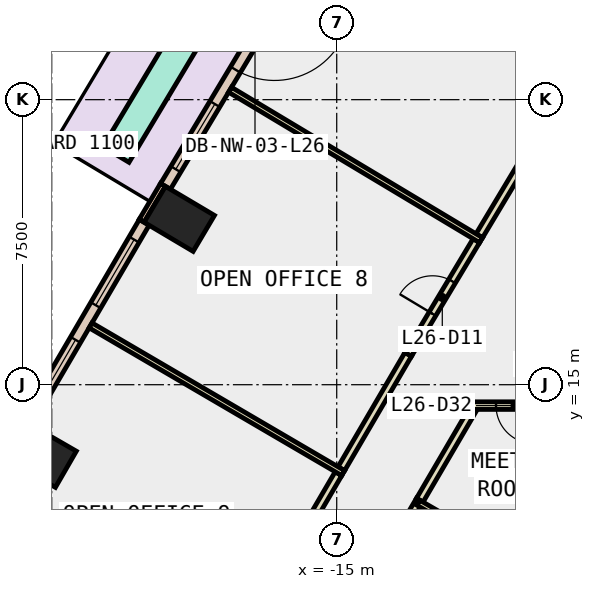
"""IFC4 building model, lengths in metres.
Left out: names, types, materials, properties, quantities, classifications, styles, units other than length and angle.
Written with IfcOpenShell. Run it as: python <this file> out.ifc"""

import sys

from ifc_helpers import new_model, si_unit, direction, frame, frame_2d, origin, origin_2d, place, context, subcontext, project, spatial, polyline, rectangle, outline, extrude, element, fill, save


model = new_model("IFC4")
c1 = context("Model", 3, precision=1e-05, world=origin(), true_north=direction((0.0, 1.0)))
c2 = subcontext(c1, "Body", "Model", "MODEL_VIEW")
j1 = project(units=[si_unit("LENGTHUNIT", "METRE"), si_unit("PLANEANGLEUNIT", "RADIAN")], contexts=[c1])
p1 = place(None, origin())
s1 = spatial("IfcSite", under=j1, at=p1, CompositionType="ELEMENT")
p2 = place(p1, origin())
s2 = spatial("IfcBuilding", under=s1, at=p2, CompositionType="ELEMENT")
p3 = place(p2, frame((0.0, 0.0, 120.2)))
s3 = spatial("IfcBuildingStorey", under=s2, at=p3, CompositionType="ELEMENT", Elevation=120.2)
for number, where, z_axis, x_axis in (
    (1, (-19.143, 19.364, -0.4), (0.0, 0.0, 1.0), (0.51, 0.86, 0.0)),
    (2, (-22.777, 13.15, -0.4), (0.0, 0.0, 1.0), (0.5, 0.866, 0.0)),
):
    element("IfcColumn", number, at=place(p3, frame(where, z_axis=z_axis, x_axis=x_axis)), inside=s3, PredefinedType="COLUMN", context=c2, shape_type="SweptSolid", body=[
        extrude(rectangle(XDim=1.1, YDim=1.5, at=origin_2d()), origin(), (0.0, 0.0, 1.0), 4.2),
    ])
p4 = place(p3, frame((0.0, 0.0, -0.4)))
e3 = element("IfcWall", 3, at=p4, inside=s3, PredefinedType="SHEAR", context=c2, shape_type="SweptSolid", body=[
    extrude(outline(polyline([(-12.267, 5.252), (-11.488, 4.802), (-6.409, 13.6), (-6.928, 14.5), (-12.267, 5.252)])), origin(), (0.0, 0.0, 1.0), 4.2),
])
p5 = place(p3, frame((-19.572, 20.258, 0.0), z_axis=(0.0, 0.0, 1.0), x_axis=(-0.510082245696, -0.860125631885, 0.0)))
e4 = element("IfcWall", 4, at=p5, inside=s3, PredefinedType="STANDARD", context=c2, shape_type="SweptSolid", body=[
    extrude(rectangle(XDim=1.1, YDim=0.15, at=frame_2d((0.55, 0.0))), origin(), (0.0, 0.0, 1.0), 3.8),
])
p6 = place(p3, frame((-16.365, 25.458, 0.0), z_axis=(0.0, 0.0, 1.0), x_axis=(-0.514078503149, -0.857743139057, 0.0)))
e5 = element("IfcWall", 5, at=p6, inside=s3, PredefinedType="STANDARD", context=c2, shape_type="SweptSolid", body=[
    extrude(rectangle(XDim=6.11, YDim=0.3, at=frame_2d((3.055, 0.0))), origin(), (0.0, 0.0, 1.0), 3.8),
])
p7 = place(p6, frame((0.528, 0.0, 0.0)))
e6 = element("IfcOpeningElement", 6, at=p7, cuts=e5, PredefinedType="OPENING", context=c2, shape_type="SweptSolid", body=[
    extrude(rectangle(XDim=2.0, YDim=2.4, at=frame_2d((1.0, 1.2))), frame((0.0, 0.16, 0.0), z_axis=(0.0, -1.0, 0.0), x_axis=(1.0, 0.0, 0.0)), (0.0, 0.0, 1.0), 0.32),
])
p8 = place(p6, frame((3.583, 0.0, 0.9)))
e7 = element("IfcOpeningElement", 7, at=p8, cuts=e5, PredefinedType="OPENING", context=c2, shape_type="SweptSolid", body=[
    extrude(rectangle(XDim=2.0, YDim=2.6, at=frame_2d((1.0, 1.3))), frame((0.0, 0.16, 0.0), z_axis=(0.0, -1.0, 0.0), x_axis=(1.0, 0.0, 0.0)), (0.0, 0.0, 1.0), 0.32),
])
p9 = place(p3, frame((-20.065, 19.273, 0.0), z_axis=(0.0, 0.0, 1.0), x_axis=(-0.504790055126, -0.863242144619, 0.0)))
e8 = element("IfcWall", 8, at=p9, inside=s3, PredefinedType="STANDARD", context=c2, shape_type="SweptSolid", body=[
    extrude(rectangle(XDim=6.109, YDim=0.3, at=frame_2d((3.055, 0.0))), origin(), (0.0, 0.0, 1.0), 3.8),
])
p10 = place(p9, frame((0.527, 0.0, 0.9)))
e9 = element("IfcOpeningElement", 9, at=p10, cuts=e8, PredefinedType="OPENING", context=c2, shape_type="SweptSolid", body=[
    extrude(rectangle(XDim=2.0, YDim=2.6, at=frame_2d((1.0, 1.3))), frame((0.0, 0.16, 0.0), z_axis=(0.0, -1.0, 0.0), x_axis=(1.0, 0.0, 0.0)), (0.0, 0.0, 1.0), 0.32),
])
p11 = place(p9, frame((3.582, 0.0, 0.9)))
e10 = element("IfcOpeningElement", 10, at=p11, cuts=e8, PredefinedType="OPENING", context=c2, shape_type="SweptSolid", body=[
    extrude(rectangle(XDim=2.0, YDim=2.6, at=frame_2d((1.0, 1.3))), frame((0.0, 0.16, 0.0), z_axis=(0.0, -1.0, 0.0), x_axis=(1.0, 0.0, 0.0)), (0.0, 0.0, 1.0), 0.32),
])
p12 = place(p3, frame((-17.72, 26.212, 0.0), z_axis=(0.0, 0.0, 1.0), x_axis=(-0.514017743989, -0.857779551437, 0.0)))
e11 = element("IfcWall", 11, at=p12, inside=s3, PredefinedType="STANDARD", context=c2, shape_type="SweptSolid", body=[
    extrude(rectangle(XDim=6.01, YDim=0.8, at=frame_2d((3.005, 0.0))), origin(), (0.0, 0.0, 1.0), 0.8),
])
p13 = place(p3, frame((-11.409, 14.364, 0.0), z_axis=(0.0, 0.0, 1.0), x_axis=(-0.504846343003, -0.863209227219, 0.0)))
e12 = element("IfcWall", 12, at=p13, inside=s3, PredefinedType="PARTITIONING", context=c2, shape_type="SweptSolid", body=[
    extrude(rectangle(XDim=2.785, YDim=0.2, at=frame_2d((1.393, 0.0))), origin(), (0.0, 0.0, 1.0), 3.8),
])
p14 = place(p3, frame((-12.815, 11.96, 0.0), z_axis=(0.0, 0.0, 1.0), x_axis=(-0.5048198861, -0.863224699946, 0.0)))
e13 = element("IfcWall", 13, at=p14, inside=s3, PredefinedType="PARTITIONING", context=c2, shape_type="SweptSolid", body=[
    extrude(rectangle(XDim=3.95, YDim=0.2, at=frame_2d((1.975, 0.0))), origin(), (0.0, 0.0, 1.0), 3.8),
])
p15 = place(p14, frame((1.475, 0.0, 0.0)))
e14 = element("IfcOpeningElement", 14, at=p15, cuts=e13, PredefinedType="OPENING", context=c2, shape_type="SweptSolid", body=[
    extrude(rectangle(XDim=1.0, YDim=2.1, at=frame_2d((0.5, 1.05))), frame((0.0, 0.11, 0.0), z_axis=(0.0, -1.0, 0.0), x_axis=(1.0, 0.0, 0.0)), (0.0, 0.0, 1.0), 0.22),
])
for number, where, z_axis, x_axis in (
    (15, (-11.249, 18.918, 0.0), (0.0, 0.0, 1.0), (0.514, 0.858, 0.0)),
    (16, (-14.879, 12.789, 0.0), (0.0, 0.0, 1.0), (0.505, 0.863, 0.0)),
):
    element("IfcWall", number, at=place(p3, frame(where, z_axis=z_axis, x_axis=x_axis)), inside=s3, PredefinedType="PARTITIONING", context=c2, shape_type="SweptSolid", body=[
        extrude(rectangle(XDim=3.487, YDim=0.2, at=frame_2d((1.743, 0.0))), origin(), (0.0, 0.0, 1.0), 3.8),
    ])
p16 = place(p3, frame((-13.119, 15.799, 0.0), z_axis=(0.0, 0.0, 1.0), x_axis=(0.514155958966, 0.857696712049, 0.0)))
e17 = element("IfcWall", 17, at=p16, inside=s3, PredefinedType="PARTITIONING", context=c2, shape_type="SweptSolid", body=[
    extrude(rectangle(XDim=3.487, YDim=0.2, at=frame_2d((1.744, 0.0))), origin(), (0.0, 0.0, 1.0), 3.8),
])
p17 = place(p16, frame((1.244, 0.0, 0.0)))
e18 = element("IfcOpeningElement", 18, at=p17, cuts=e17, PredefinedType="OPENING", context=c2, shape_type="SweptSolid", body=[
    extrude(rectangle(XDim=1.0, YDim=2.1, at=frame_2d((0.5, 1.05))), frame((0.0, 0.11, 0.0), z_axis=(0.0, -1.0, 0.0), x_axis=(1.0, 0.0, 0.0)), (0.0, 0.0, 1.0), 0.22),
])
p18 = place(p3, frame((-16.714, 9.65, 0.0), z_axis=(0.0, 0.0, 1.0), x_axis=(0.504885284202, 0.863186451351, 0.0)))
e19 = element("IfcWall", 19, at=p18, inside=s3, PredefinedType="PARTITIONING", context=c2, shape_type="SweptSolid", body=[
    extrude(rectangle(XDim=3.486, YDim=0.2, at=frame_2d((1.743, 0.0))), origin(), (0.0, 0.0, 1.0), 3.8),
])
p19 = place(p3, frame((-9.537, 9.981, 0.0), z_axis=(0.0, 0.0, 1.0), x_axis=(-0.866068787954, 0.499924848885, 0.0)))
e20 = element("IfcWall", 20, at=p19, inside=s3, PredefinedType="PARTITIONING", context=c2, shape_type="SweptSolid", body=[
    extrude(rectangle(XDim=3.829, YDim=0.15, at=frame_2d((1.914, 0.0))), origin(), (0.0, 0.0, 1.0), 3.8),
])
p20 = place(p3, frame((-6.957, 14.45, 0.0), z_axis=(0.0, 0.0, 1.0), x_axis=(-1.0, 0.0, 0.0)))
e21 = element("IfcWall", 21, at=p20, inside=s3, PredefinedType="PARTITIONING", context=c2, shape_type="SweptSolid", body=[
    extrude(rectangle(XDim=4.502, YDim=0.2, at=frame_2d((2.251, 0.0))), origin(), (0.0, 0.0, 1.0), 3.8),
])
p21 = place(p20, frame((1.751, 0.0, 0.0)))
e22 = element("IfcOpeningElement", 22, at=p21, cuts=e21, PredefinedType="OPENING", context=c2, shape_type="SweptSolid", body=[
    extrude(rectangle(XDim=1.0, YDim=2.1, at=frame_2d((0.5, 1.05))), frame((0.0, 0.11, 0.0), z_axis=(0.0, -1.0, 0.0), x_axis=(1.0, 0.0, 0.0)), (0.0, 0.0, 1.0), 0.22),
])
p22 = place(p20, frame((2.851, 0.0, 0.0)))
e23 = element("IfcOpeningElement", 23, at=p22, cuts=e21, PredefinedType="OPENING", context=c2, shape_type="SweptSolid", body=[
    extrude(rectangle(XDim=1.0, YDim=2.1, at=frame_2d((0.5, 1.05))), frame((0.0, 0.11, 0.0), z_axis=(0.0, -1.0, 0.0), x_axis=(1.0, 0.0, 0.0)), (0.0, 0.0, 1.0), 0.22),
])
p23 = place(p3, frame((-11.202, 18.803, 0.0), z_axis=(0.0, 0.0, 1.0), x_axis=(-0.857778149162, 0.514020084062, 0.0)))
e24 = element("IfcWall", 24, at=p23, inside=s3, PredefinedType="PARTITIONING", context=c2, shape_type="SweptSolid", body=[
    extrude(rectangle(XDim=7.7, YDim=0.15, at=frame_2d((3.85, 0.0))), origin(), (0.0, 0.0, 1.0), 3.8),
])
p24 = place(p3, frame((-14.83, 12.674, 0.0), z_axis=(0.0, 0.0, 1.0), x_axis=(-0.863237916953, 0.504797284794, 0.0)))
e25 = element("IfcWall", 25, at=p24, inside=s3, PredefinedType="PARTITIONING", context=c2, shape_type="SweptSolid", body=[
    extrude(rectangle(XDim=7.7, YDim=0.15, at=frame_2d((3.85, 0.0))), origin(), (0.0, 0.0, 1.0), 3.8),
])
p25 = place(p7, origin())
e26 = element("IfcDoor", 26, at=p25, inside=s3, OperationType="SLIDING_TO_LEFT", PredefinedType="DOOR", context=c2, shape_type="SweptSolid", body=[
    extrude(rectangle(XDim=2.0, YDim=2.4, at=frame_2d((1.0, 1.2))), frame((0.0, 0.025, 0.0), z_axis=(0.0, -1.0, 0.0), x_axis=(1.0, 0.0, 0.0)), (0.0, 0.0, 1.0), 0.05),
])
fill(e6, e26)
p26 = place(p8, origin())
e27 = element("IfcWindow", 27, at=p26, inside=s3, PartitioningType="SINGLE_PANEL", PredefinedType="WINDOW", context=c2, shape_type="SweptSolid", body=[
    extrude(rectangle(XDim=2.0, YDim=2.6, at=frame_2d((1.0, 1.3))), frame((0.0, 0.03, 0.0), z_axis=(0.0, -1.0, 0.0), x_axis=(1.0, 0.0, 0.0)), (0.0, 0.0, 1.0), 0.06),
])
fill(e7, e27)
p27 = place(p10, origin())
e28 = element("IfcWindow", 28, at=p27, inside=s3, PartitioningType="SINGLE_PANEL", PredefinedType="WINDOW", context=c2, shape_type="SweptSolid", body=[
    extrude(rectangle(XDim=2.0, YDim=2.6, at=frame_2d((1.0, 1.3))), frame((0.0, 0.03, 0.0), z_axis=(0.0, -1.0, 0.0), x_axis=(1.0, 0.0, 0.0)), (0.0, 0.0, 1.0), 0.06),
])
fill(e9, e28)
p28 = place(p11, origin())
e29 = element("IfcWindow", 29, at=p28, inside=s3, PartitioningType="SINGLE_PANEL", PredefinedType="WINDOW", context=c2, shape_type="SweptSolid", body=[
    extrude(rectangle(XDim=2.0, YDim=2.6, at=frame_2d((1.0, 1.3))), frame((0.0, 0.03, 0.0), z_axis=(0.0, -1.0, 0.0), x_axis=(1.0, 0.0, 0.0)), (0.0, 0.0, 1.0), 0.06),
])
fill(e10, e29)
p29 = place(p17, origin())
e30 = element("IfcDoor", 30, at=p29, inside=s3, OperationType="SINGLE_SWING_LEFT", PredefinedType="DOOR", context=c2, shape_type="SweptSolid", body=[
    extrude(rectangle(XDim=1.0, YDim=2.1, at=frame_2d((0.5, 1.05))), frame((0.0, 0.025, 0.0), z_axis=(0.0, -1.0, 0.0), x_axis=(1.0, 0.0, 0.0)), (0.0, 0.0, 1.0), 0.05),
])
fill(e18, e30)
p30 = place(p22, origin())
e31 = element("IfcDoor", 31, at=p30, inside=s3, OperationType="SINGLE_SWING_RIGHT", PredefinedType="DOOR", context=c2, shape_type="SweptSolid", body=[
    extrude(rectangle(XDim=1.0, YDim=2.1, at=frame_2d((0.5, 1.05))), frame((0.0, 0.025, 0.0), z_axis=(0.0, -1.0, 0.0), x_axis=(1.0, 0.0, 0.0)), (0.0, 0.0, 1.0), 0.05),
])
fill(e23, e31)
save(model, sys.argv[1])
